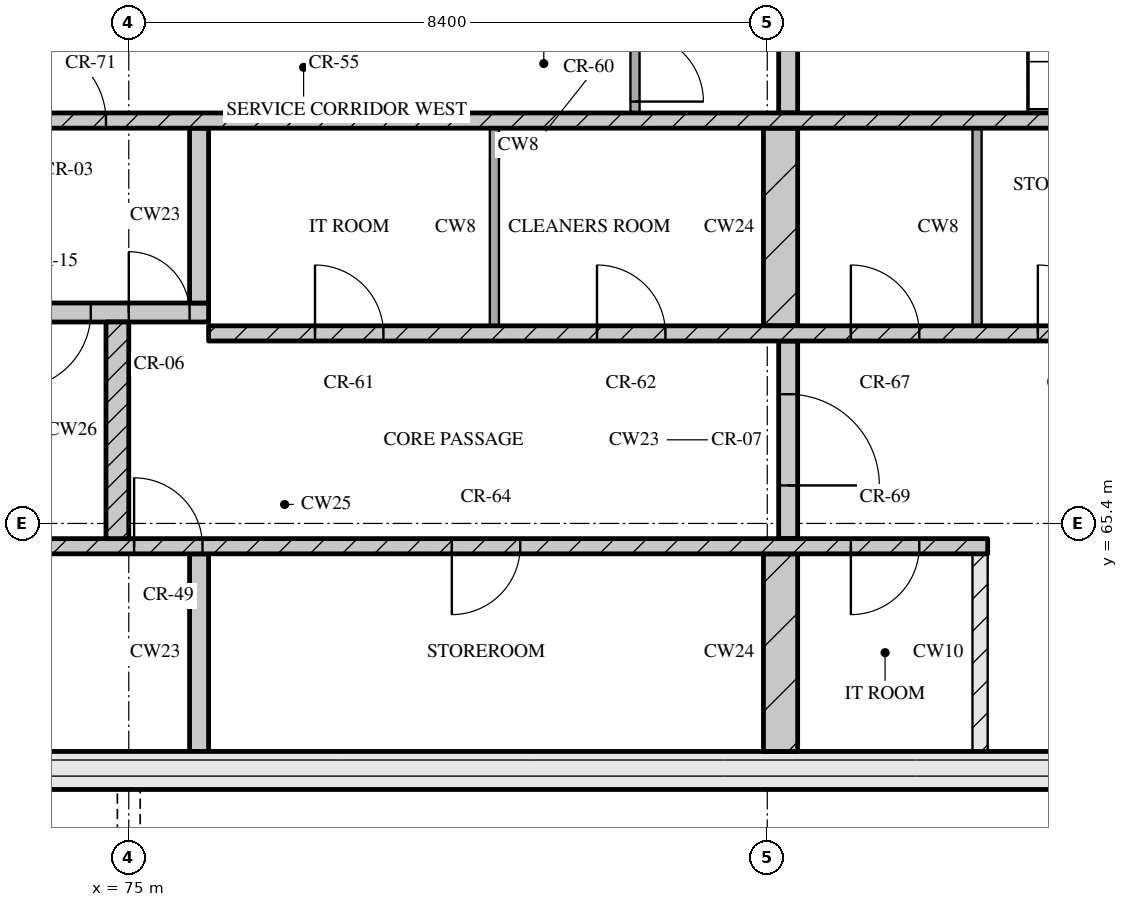
"""IFC4 building model, lengths in metres.
Left out: names, types, materials, properties, quantities, classifications, styles, units other than length and angle.
Written with IfcOpenShell. Run it as: python <this file> out.ifc"""

import sys

from ifc_helpers import new_model, si_unit, direction, frame, frame_2d, origin, place, context, subcontext, project, spatial, rectangle, extrude, element, fill, save


model = new_model("IFC4")
c1 = context("Model", 3, precision=1e-05, world=origin(), true_north=direction((0.0, 1.0)))
c2 = subcontext(c1, "Body", "Model", "MODEL_VIEW")
j1 = project(units=[si_unit("LENGTHUNIT", "METRE"), si_unit("PLANEANGLEUNIT", "RADIAN")], contexts=[c1])
p1 = place(None, origin())
s1 = spatial("IfcSite", under=j1, at=p1, CompositionType="ELEMENT")
p2 = place(p1, origin())
s2 = spatial("IfcBuilding", under=s1, at=p2, CompositionType="ELEMENT")
p3 = place(p2, frame((0.0, 0.0, 267.15)))
s3 = spatial("IfcBuildingStorey", under=s2, at=p3, CompositionType="ELEMENT", Elevation=267.15)
p4 = place(p3, frame((67.3, 62.15, 0.0), z_axis=(0.0, 0.0, 1.0), x_axis=(1.0, 0.0, 0.0)))
e1 = element("IfcWall", 1, at=p4, inside=s3, PredefinedType="SOLIDWALL", context=c2, shape_type="SweptSolid", body=[
    extrude(rectangle(XDim=40.6, YDim=0.5, at=frame_2d((20.3, 0.0))), origin(), (0.0, 0.0, 1.0), 3.32),
])
p5 = place(p4, frame((20.65, 0.0, 0.0)))
e2 = element("IfcOpeningElement", 2, at=p5, cuts=e1, PredefinedType="OPENING", context=c2, shape_type="SweptSolid", body=[
    extrude(rectangle(XDim=1.8, YDim=2.1, at=frame_2d((0.9, 1.05))), frame((0.0, 0.26, 0.0), z_axis=(0.0, -1.0, 0.0), x_axis=(1.0, 0.0, 0.0)), (0.0, 0.0, 1.0), 0.52),
])
p6 = place(p3, frame((75.925, 62.4, 0.0), z_axis=(0.0, 0.0, 1.0), x_axis=(0.0, 1.0, 0.0)))
e3 = element("IfcWall", 3, at=p6, inside=s3, PredefinedType="SOLIDWALL", context=c2, shape_type="SweptSolid", body=[
    extrude(rectangle(XDim=2.6, YDim=0.25, at=frame_2d((1.3, 0.0))), origin(), (0.0, 0.0, 1.0), 3.32),
])
p7 = place(p3, frame((83.575, 62.4, 0.0), z_axis=(0.0, 0.0, 1.0), x_axis=(0.0, 1.0, 0.0)))
e4 = element("IfcWall", 4, at=p7, inside=s3, PredefinedType="SOLIDWALL", context=c2, shape_type="SweptSolid", body=[
    extrude(rectangle(XDim=2.6, YDim=0.45, at=frame_2d((1.3, 0.0))), origin(), (0.0, 0.0, 1.0), 3.32),
])
p8 = place(p3, frame((86.2, 62.4, 0.0), z_axis=(0.0, 0.0, 1.0), x_axis=(0.0, 1.0, 0.0)))
e5 = element("IfcWall", 5, at=p8, inside=s3, PredefinedType="PARTITIONING", context=c2, shape_type="SweptSolid", body=[
    extrude(rectangle(XDim=2.6, YDim=0.2, at=frame_2d((1.3, 0.0))), origin(), (0.0, 0.0, 1.0), 3.32),
])
p9 = place(p3, frame((67.8, 65.1, 0.0), z_axis=(0.0, 0.0, 1.0), x_axis=(1.0, 0.0, 0.0)))
e6 = element("IfcWall", 6, at=p9, inside=s3, PredefinedType="SOLIDWALL", context=c2, shape_type="SweptSolid", body=[
    extrude(rectangle(XDim=18.5, YDim=0.2, at=frame_2d((9.25, 0.0))), origin(), (0.0, 0.0, 1.0), 3.32),
])
p10 = place(p9, frame((7.27, 0.0, 0.0)))
e7 = element("IfcOpeningElement", 7, at=p10, cuts=e6, PredefinedType="OPENING", context=c2, shape_type="SweptSolid", body=[
    extrude(rectangle(XDim=0.9, YDim=2.1, at=frame_2d((0.45, 1.05))), frame((0.0, 0.11, 0.0), z_axis=(0.0, -1.0, 0.0), x_axis=(1.0, 0.0, 0.0)), (0.0, 0.0, 1.0), 0.22),
])
p11 = place(p9, frame((11.45, 0.0, 0.0)))
e8 = element("IfcOpeningElement", 8, at=p11, cuts=e6, PredefinedType="OPENING", context=c2, shape_type="SweptSolid", body=[
    extrude(rectangle(XDim=0.9, YDim=2.1, at=frame_2d((0.45, 1.05))), frame((0.0, 0.11, 0.0), z_axis=(0.0, -1.0, 0.0), x_axis=(1.0, 0.0, 0.0)), (0.0, 0.0, 1.0), 0.22),
])
p12 = place(p9, frame((16.7, 0.0, 0.0)))
e9 = element("IfcOpeningElement", 9, at=p12, cuts=e6, PredefinedType="OPENING", context=c2, shape_type="SweptSolid", body=[
    extrude(rectangle(XDim=0.9, YDim=2.1, at=frame_2d((0.45, 1.05))), frame((0.0, 0.11, 0.0), z_axis=(0.0, -1.0, 0.0), x_axis=(1.0, 0.0, 0.0)), (0.0, 0.0, 1.0), 0.22),
])
p13 = place(p3, frame((74.85, 65.2, 0.0), z_axis=(0.0, 0.0, 1.0), x_axis=(0.0, 1.0, 0.0)))
e10 = element("IfcWall", 10, at=p13, inside=s3, PredefinedType="SOLIDWALL", context=c2, shape_type="SweptSolid", body=[
    extrude(rectangle(XDim=2.85, YDim=0.3, at=frame_2d((1.425, 0.0))), origin(), (0.0, 0.0, 1.0), 3.32),
])
p14 = place(p3, frame((83.675, 65.2, 0.0), z_axis=(0.0, 0.0, 1.0), x_axis=(0.0, 1.0, 0.0)))
e11 = element("IfcWall", 11, at=p14, inside=s3, PredefinedType="SOLIDWALL", context=c2, shape_type="SweptSolid", body=[
    extrude(rectangle(XDim=2.6, YDim=0.25, at=frame_2d((1.3, 0.0))), origin(), (0.0, 0.0, 1.0), 3.32),
])
p15 = place(p14, frame((0.7, 0.0, 0.0)))
e12 = element("IfcOpeningElement", 12, at=p15, cuts=e11, PredefinedType="OPENING", context=c2, shape_type="SweptSolid", body=[
    extrude(rectangle(XDim=1.2, YDim=2.1, at=frame_2d((0.6, 1.05))), frame((0.0, 0.135, 0.0), z_axis=(0.0, -1.0, 0.0), x_axis=(1.0, 0.0, 0.0)), (0.0, 0.0, 1.0), 0.27),
])
p16 = place(p3, frame((76.05, 67.9, 0.0), z_axis=(0.0, 0.0, 1.0), x_axis=(1.0, 0.0, 0.0)))
e13 = element("IfcWall", 13, at=p16, inside=s3, PredefinedType="SOLIDWALL", context=c2, shape_type="SweptSolid", body=[
    extrude(rectangle(XDim=23.1, YDim=0.2, at=frame_2d((11.55, 0.0))), origin(), (0.0, 0.0, 1.0), 3.32),
])
p17 = place(p16, frame((1.4, 0.0, 0.0)))
e14 = element("IfcOpeningElement", 14, at=p17, cuts=e13, PredefinedType="OPENING", context=c2, shape_type="SweptSolid", body=[
    extrude(rectangle(XDim=0.9, YDim=2.1, at=frame_2d((0.45, 1.05))), frame((0.0, 0.11, 0.0), z_axis=(0.0, -1.0, 0.0), x_axis=(1.0, 0.0, 0.0)), (0.0, 0.0, 1.0), 0.22),
])
p18 = place(p16, frame((5.11, 0.0, 0.0)))
e15 = element("IfcOpeningElement", 15, at=p18, cuts=e13, PredefinedType="OPENING", context=c2, shape_type="SweptSolid", body=[
    extrude(rectangle(XDim=0.9, YDim=2.1, at=frame_2d((0.45, 1.05))), frame((0.0, 0.11, 0.0), z_axis=(0.0, -1.0, 0.0), x_axis=(1.0, 0.0, 0.0)), (0.0, 0.0, 1.0), 0.22),
])
p19 = place(p16, frame((8.45, 0.0, 0.0)))
e16 = element("IfcOpeningElement", 16, at=p19, cuts=e13, PredefinedType="OPENING", context=c2, shape_type="SweptSolid", body=[
    extrude(rectangle(XDim=0.9, YDim=2.1, at=frame_2d((0.45, 1.05))), frame((0.0, 0.11, 0.0), z_axis=(0.0, -1.0, 0.0), x_axis=(1.0, 0.0, 0.0)), (0.0, 0.0, 1.0), 0.22),
])
p20 = place(p16, frame((10.91, 0.0, 0.0)))
e17 = element("IfcOpeningElement", 17, at=p20, cuts=e13, PredefinedType="OPENING", context=c2, shape_type="SweptSolid", body=[
    extrude(rectangle(XDim=0.9, YDim=2.1, at=frame_2d((0.45, 1.05))), frame((0.0, 0.11, 0.0), z_axis=(0.0, -1.0, 0.0), x_axis=(1.0, 0.0, 0.0)), (0.0, 0.0, 1.0), 0.22),
])
p21 = place(p16, frame((13.55, 0.0, 0.0)))
e18 = element("IfcOpeningElement", 18, at=p21, cuts=e13, PredefinedType="OPENING", context=c2, shape_type="SweptSolid", body=[
    extrude(rectangle(XDim=1.0, YDim=2.1, at=frame_2d((0.5, 1.05))), frame((0.0, 0.11, 0.0), z_axis=(0.0, -1.0, 0.0), x_axis=(1.0, 0.0, 0.0)), (0.0, 0.0, 1.0), 0.22),
])
p22 = place(p16, frame((16.2, 0.0, 0.0)))
e19 = element("IfcOpeningElement", 19, at=p22, cuts=e13, PredefinedType="OPENING", context=c2, shape_type="SweptSolid", body=[
    extrude(rectangle(XDim=1.1, YDim=2.1, at=frame_2d((0.55, 1.05))), frame((0.0, 0.11, 0.0), z_axis=(0.0, -1.0, 0.0), x_axis=(1.0, 0.0, 0.0)), (0.0, 0.0, 1.0), 0.22),
])
p23 = place(p16, frame((18.7, 0.0, 0.0)))
e20 = element("IfcOpeningElement", 20, at=p23, cuts=e13, PredefinedType="OPENING", context=c2, shape_type="SweptSolid", body=[
    extrude(rectangle(XDim=1.1, YDim=2.1, at=frame_2d((0.55, 1.05))), frame((0.0, 0.11, 0.0), z_axis=(0.0, -1.0, 0.0), x_axis=(1.0, 0.0, 0.0)), (0.0, 0.0, 1.0), 0.22),
])
p24 = place(p16, frame((21.2, 0.0, 0.0)))
e21 = element("IfcOpeningElement", 21, at=p24, cuts=e13, PredefinedType="OPENING", context=c2, shape_type="SweptSolid", body=[
    extrude(rectangle(XDim=1.1, YDim=2.1, at=frame_2d((0.55, 1.05))), frame((0.0, 0.11, 0.0), z_axis=(0.0, -1.0, 0.0), x_axis=(1.0, 0.0, 0.0)), (0.0, 0.0, 1.0), 0.22),
])
p25 = place(p3, frame((79.81, 68.0, 0.0), z_axis=(0.0, 0.0, 1.0), x_axis=(0.0, 1.0, 0.0)))
e22 = element("IfcWall", 22, at=p25, inside=s3, PredefinedType="PARTITIONING", context=c2, shape_type="SweptSolid", body=[
    extrude(rectangle(XDim=2.6, YDim=0.12, at=frame_2d((1.3, 0.0))), origin(), (0.0, 0.0, 1.0), 3.32),
])
p26 = place(p3, frame((83.575, 68.0, 0.0), z_axis=(0.0, 0.0, 1.0), x_axis=(0.0, 1.0, 0.0)))
e23 = element("IfcWall", 23, at=p26, inside=s3, PredefinedType="SOLIDWALL", context=c2, shape_type="SweptSolid", body=[
    extrude(rectangle(XDim=2.6, YDim=0.45, at=frame_2d((1.3, 0.0))), origin(), (0.0, 0.0, 1.0), 3.32),
])
p27 = place(p3, frame((86.16, 68.0, 0.0), z_axis=(0.0, 0.0, 1.0), x_axis=(0.0, 1.0, 0.0)))
e24 = element("IfcWall", 24, at=p27, inside=s3, PredefinedType="PARTITIONING", context=c2, shape_type="SweptSolid", body=[
    extrude(rectangle(XDim=2.6, YDim=0.12, at=frame_2d((1.3, 0.0))), origin(), (0.0, 0.0, 1.0), 3.32),
])
p28 = place(p3, frame((67.8, 68.175, 0.0), z_axis=(0.0, 0.0, 1.0), x_axis=(1.0, 0.0, 0.0)))
e25 = element("IfcWall", 25, at=p28, inside=s3, PredefinedType="SOLIDWALL", context=c2, shape_type="SweptSolid", body=[
    extrude(rectangle(XDim=8.25, YDim=0.25, at=frame_2d((4.125, 0.0))), origin(), (0.0, 0.0, 1.0), 3.32),
])
p29 = place(p28, frame((5.7, 0.0, 0.0)))
e26 = element("IfcOpeningElement", 26, at=p29, cuts=e25, PredefinedType="OPENING", context=c2, shape_type="SweptSolid", body=[
    extrude(rectangle(XDim=1.0, YDim=2.1, at=frame_2d((0.5, 1.05))), frame((0.0, 0.135, 0.0), z_axis=(0.0, -1.0, 0.0), x_axis=(1.0, 0.0, 0.0)), (0.0, 0.0, 1.0), 0.27),
])
p30 = place(p28, frame((7.2, 0.0, 0.0)))
e27 = element("IfcOpeningElement", 27, at=p30, cuts=e25, PredefinedType="OPENING", context=c2, shape_type="SweptSolid", body=[
    extrude(rectangle(XDim=0.8, YDim=2.1, at=frame_2d((0.4, 1.05))), frame((0.0, 0.135, 0.0), z_axis=(0.0, -1.0, 0.0), x_axis=(1.0, 0.0, 0.0)), (0.0, 0.0, 1.0), 0.27),
])
p31 = place(p3, frame((75.925, 68.3, 0.0), z_axis=(0.0, 0.0, 1.0), x_axis=(0.0, 1.0, 0.0)))
e28 = element("IfcWall", 28, at=p31, inside=s3, PredefinedType="SOLIDWALL", context=c2, shape_type="SweptSolid", body=[
    extrude(rectangle(XDim=2.3, YDim=0.25, at=frame_2d((1.15, 0.0))), origin(), (0.0, 0.0, 1.0), 3.32),
])
p32 = place(p3, frame((67.8, 70.7, 0.0), z_axis=(0.0, 0.0, 1.0), x_axis=(1.0, 0.0, 0.0)))
e29 = element("IfcWall", 29, at=p32, inside=s3, PredefinedType="SOLIDWALL", context=c2, shape_type="SweptSolid", body=[
    extrude(rectangle(XDim=39.6, YDim=0.2, at=frame_2d((19.8, 0.0))), origin(), (0.0, 0.0, 1.0), 3.32),
])
p33 = place(p32, frame((0.65, 0.0, 0.0)))
e30 = element("IfcOpeningElement", 30, at=p33, cuts=e29, PredefinedType="OPENING", context=c2, shape_type="SweptSolid", body=[
    extrude(rectangle(XDim=1.1, YDim=2.1, at=frame_2d((0.55, 1.05))), frame((0.0, 0.11, 0.0), z_axis=(0.0, -1.0, 0.0), x_axis=(1.0, 0.0, 0.0)), (0.0, 0.0, 1.0), 0.22),
])
p34 = place(p32, frame((3.25, 0.0, 0.0)))
e31 = element("IfcOpeningElement", 31, at=p34, cuts=e29, PredefinedType="OPENING", context=c2, shape_type="SweptSolid", body=[
    extrude(rectangle(XDim=1.1, YDim=2.1, at=frame_2d((0.55, 1.05))), frame((0.0, 0.11, 0.0), z_axis=(0.0, -1.0, 0.0), x_axis=(1.0, 0.0, 0.0)), (0.0, 0.0, 1.0), 0.22),
])
p35 = place(p32, frame((5.9, 0.0, 0.0)))
e32 = element("IfcOpeningElement", 32, at=p35, cuts=e29, PredefinedType="OPENING", context=c2, shape_type="SweptSolid", body=[
    extrude(rectangle(XDim=1.0, YDim=2.1, at=frame_2d((0.5, 1.05))), frame((0.0, 0.11, 0.0), z_axis=(0.0, -1.0, 0.0), x_axis=(1.0, 0.0, 0.0)), (0.0, 0.0, 1.0), 0.22),
])
p36 = place(p32, frame((21.7, 0.0, 0.0)))
e33 = element("IfcOpeningElement", 33, at=p36, cuts=e29, PredefinedType="OPENING", context=c2, shape_type="SweptSolid", body=[
    extrude(rectangle(XDim=1.0, YDim=2.1, at=frame_2d((0.5, 1.05))), frame((0.0, 0.11, 0.0), z_axis=(0.0, -1.0, 0.0), x_axis=(1.0, 0.0, 0.0)), (0.0, 0.0, 1.0), 0.22),
])
p37 = place(p32, frame((32.7, 0.0, 0.0)))
e34 = element("IfcOpeningElement", 34, at=p37, cuts=e29, PredefinedType="OPENING", context=c2, shape_type="SweptSolid", body=[
    extrude(rectangle(XDim=1.0, YDim=2.1, at=frame_2d((0.5, 1.05))), frame((0.0, 0.11, 0.0), z_axis=(0.0, -1.0, 0.0), x_axis=(1.0, 0.0, 0.0)), (0.0, 0.0, 1.0), 0.22),
])
p38 = place(p32, frame((35.25, 0.0, 0.0)))
e35 = element("IfcOpeningElement", 35, at=p38, cuts=e29, PredefinedType="OPENING", context=c2, shape_type="SweptSolid", body=[
    extrude(rectangle(XDim=1.1, YDim=2.1, at=frame_2d((0.55, 1.05))), frame((0.0, 0.11, 0.0), z_axis=(0.0, -1.0, 0.0), x_axis=(1.0, 0.0, 0.0)), (0.0, 0.0, 1.0), 0.22),
])
p39 = place(p32, frame((37.85, 0.0, 0.0)))
e36 = element("IfcOpeningElement", 36, at=p39, cuts=e29, PredefinedType="OPENING", context=c2, shape_type="SweptSolid", body=[
    extrude(rectangle(XDim=1.1, YDim=2.1, at=frame_2d((0.55, 1.05))), frame((0.0, 0.11, 0.0), z_axis=(0.0, -1.0, 0.0), x_axis=(1.0, 0.0, 0.0)), (0.0, 0.0, 1.0), 0.22),
])
p40 = place(p3, frame((81.66, 70.8, 0.0), z_axis=(0.0, 0.0, 1.0), x_axis=(0.0, 1.0, 0.0)))
e37 = element("IfcWall", 37, at=p40, inside=s3, PredefinedType="PARTITIONING", context=c2, shape_type="SweptSolid", body=[
    extrude(rectangle(XDim=1.2, YDim=0.12, at=frame_2d((0.6, 0.0))), origin(), (0.0, 0.0, 1.0), 3.32),
])
p41 = place(p40, frame((0.15, 0.0, 0.0)))
e38 = element("IfcOpeningElement", 38, at=p41, cuts=e37, PredefinedType="OPENING", context=c2, shape_type="SweptSolid", body=[
    extrude(rectangle(XDim=0.9, YDim=2.1, at=frame_2d((0.45, 1.05))), frame((0.0, 0.07, 0.0), z_axis=(0.0, -1.0, 0.0), x_axis=(1.0, 0.0, 0.0)), (0.0, 0.0, 1.0), 0.14),
])
p42 = place(p3, frame((83.675, 70.8, 0.0), z_axis=(0.0, 0.0, 1.0), x_axis=(0.0, 1.0, 0.0)))
e39 = element("IfcWall", 39, at=p42, inside=s3, PredefinedType="SOLIDWALL", context=c2, shape_type="SweptSolid", body=[
    extrude(rectangle(XDim=2.95, YDim=0.25, at=frame_2d((1.475, 0.0))), origin(), (0.0, 0.0, 1.0), 3.32),
])
p43 = place(p10, origin())
e40 = element("IfcDoor", 40, at=p43, inside=s3, OperationType="SINGLE_SWING_LEFT", PredefinedType="DOOR", context=c2, shape_type="SweptSolid", body=[
    extrude(rectangle(XDim=0.9, YDim=2.1, at=frame_2d((0.45, 1.05))), frame((0.0, 0.025, 0.0), z_axis=(0.0, -1.0, 0.0), x_axis=(1.0, 0.0, 0.0)), (0.0, 0.0, 1.0), 0.05),
])
fill(e7, e40)
p44 = place(p11, origin())
e41 = element("IfcDoor", 41, at=p44, inside=s3, OperationType="SINGLE_SWING_RIGHT", PredefinedType="DOOR", context=c2, shape_type="SweptSolid", body=[
    extrude(rectangle(XDim=0.9, YDim=2.1, at=frame_2d((0.45, 1.05))), frame((0.0, 0.025, 0.0), z_axis=(0.0, -1.0, 0.0), x_axis=(1.0, 0.0, 0.0)), (0.0, 0.0, 1.0), 0.05),
])
fill(e8, e41)
p45 = place(p12, origin())
e42 = element("IfcDoor", 42, at=p45, inside=s3, OperationType="SINGLE_SWING_RIGHT", PredefinedType="DOOR", context=c2, shape_type="SweptSolid", body=[
    extrude(rectangle(XDim=0.9, YDim=2.1, at=frame_2d((0.45, 1.05))), frame((0.0, 0.025, 0.0), z_axis=(0.0, -1.0, 0.0), x_axis=(1.0, 0.0, 0.0)), (0.0, 0.0, 1.0), 0.05),
])
fill(e9, e42)
p46 = place(p15, origin())
e43 = element("IfcDoor", 43, at=p46, inside=s3, OperationType="SINGLE_SWING_RIGHT", PredefinedType="DOOR", context=c2, shape_type="SweptSolid", body=[
    extrude(rectangle(XDim=1.2, YDim=2.1, at=frame_2d((0.6, 1.05))), frame((0.0, 0.025, 0.0), z_axis=(0.0, -1.0, 0.0), x_axis=(1.0, 0.0, 0.0)), (0.0, 0.0, 1.0), 0.05),
])
fill(e12, e43)
p47 = place(p17, origin())
e44 = element("IfcDoor", 44, at=p47, inside=s3, OperationType="SINGLE_SWING_LEFT", PredefinedType="DOOR", context=c2, shape_type="SweptSolid", body=[
    extrude(rectangle(XDim=0.9, YDim=2.1, at=frame_2d((0.45, 1.05))), frame((0.0, 0.025, 0.0), z_axis=(0.0, -1.0, 0.0), x_axis=(1.0, 0.0, 0.0)), (0.0, 0.0, 1.0), 0.05),
])
fill(e14, e44)
p48 = place(p18, origin())
e45 = element("IfcDoor", 45, at=p48, inside=s3, OperationType="SINGLE_SWING_LEFT", PredefinedType="DOOR", context=c2, shape_type="SweptSolid", body=[
    extrude(rectangle(XDim=0.9, YDim=2.1, at=frame_2d((0.45, 1.05))), frame((0.0, 0.025, 0.0), z_axis=(0.0, -1.0, 0.0), x_axis=(1.0, 0.0, 0.0)), (0.0, 0.0, 1.0), 0.05),
])
fill(e15, e45)
p49 = place(p19, origin())
e46 = element("IfcDoor", 46, at=p49, inside=s3, OperationType="SINGLE_SWING_LEFT", PredefinedType="DOOR", context=c2, shape_type="SweptSolid", body=[
    extrude(rectangle(XDim=0.9, YDim=2.1, at=frame_2d((0.45, 1.05))), frame((0.0, 0.025, 0.0), z_axis=(0.0, -1.0, 0.0), x_axis=(1.0, 0.0, 0.0)), (0.0, 0.0, 1.0), 0.05),
])
fill(e16, e46)
p50 = place(p20, origin())
e47 = element("IfcDoor", 47, at=p50, inside=s3, OperationType="SINGLE_SWING_LEFT", PredefinedType="DOOR", context=c2, shape_type="SweptSolid", body=[
    extrude(rectangle(XDim=0.9, YDim=2.1, at=frame_2d((0.45, 1.05))), frame((0.0, 0.025, 0.0), z_axis=(0.0, -1.0, 0.0), x_axis=(1.0, 0.0, 0.0)), (0.0, 0.0, 1.0), 0.05),
])
fill(e17, e47)
p51 = place(p29, origin())
e48 = element("IfcDoor", 48, at=p51, inside=s3, OperationType="SINGLE_SWING_RIGHT", PredefinedType="DOOR", context=c2, shape_type="SweptSolid", body=[
    extrude(rectangle(XDim=1.0, YDim=2.1, at=frame_2d((0.5, 1.05))), frame((0.0, 0.025, 0.0), z_axis=(0.0, -1.0, 0.0), x_axis=(1.0, 0.0, 0.0)), (0.0, 0.0, 1.0), 0.05),
])
fill(e26, e48)
p52 = place(p30, origin())
e49 = element("IfcDoor", 49, at=p52, inside=s3, OperationType="SINGLE_SWING_LEFT", PredefinedType="DOOR", context=c2, shape_type="SweptSolid", body=[
    extrude(rectangle(XDim=0.8, YDim=2.1, at=frame_2d((0.4, 1.05))), frame((0.0, 0.025, 0.0), z_axis=(0.0, -1.0, 0.0), x_axis=(1.0, 0.0, 0.0)), (0.0, 0.0, 1.0), 0.05),
])
fill(e27, e49)
p53 = place(p35, origin())
e50 = element("IfcDoor", 50, at=p53, inside=s3, OperationType="SINGLE_SWING_LEFT", PredefinedType="DOOR", context=c2, shape_type="SweptSolid", body=[
    extrude(rectangle(XDim=1.0, YDim=2.1, at=frame_2d((0.5, 1.05))), frame((0.0, 0.025, 0.0), z_axis=(0.0, -1.0, 0.0), x_axis=(1.0, 0.0, 0.0)), (0.0, 0.0, 1.0), 0.05),
])
fill(e32, e50)
p54 = place(p41, origin())
e51 = element("IfcDoor", 51, at=p54, inside=s3, OperationType="SINGLE_SWING_RIGHT", PredefinedType="DOOR", context=c2, shape_type="SweptSolid", body=[
    extrude(rectangle(XDim=0.9, YDim=2.1, at=frame_2d((0.45, 1.05))), frame((0.0, 0.025, 0.0), z_axis=(0.0, -1.0, 0.0), x_axis=(1.0, 0.0, 0.0)), (0.0, 0.0, 1.0), 0.05),
])
fill(e38, e51)
save(model, sys.argv[1])
